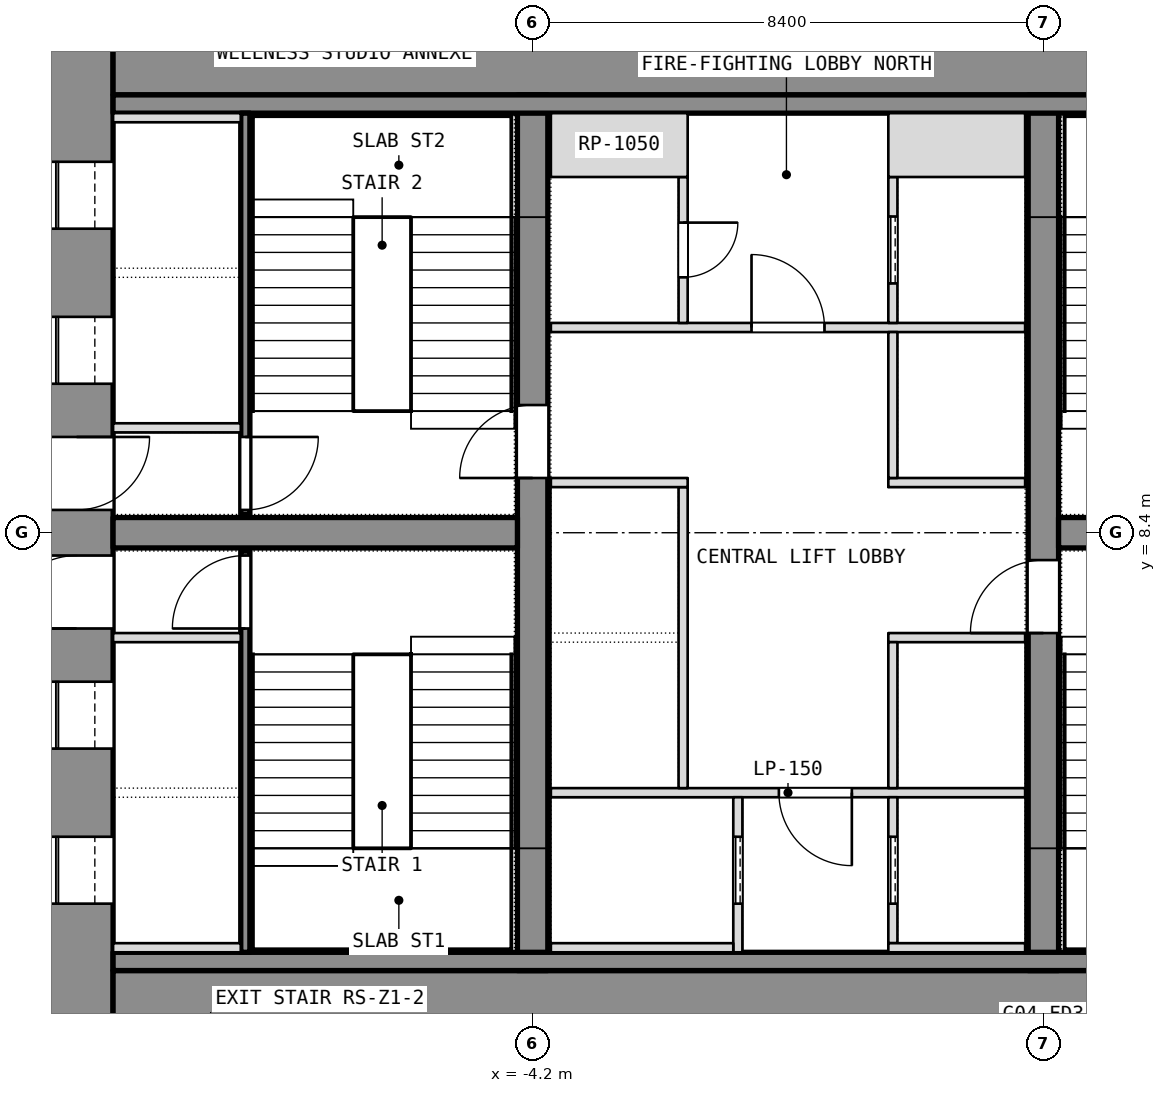
"""IFC4 building model, lengths in metres.
Left out: names, types, materials, properties, quantities, classifications, styles, units other than length and angle.
Written with IfcOpenShell. Run it as: python <this file> out.ifc"""

import sys

from ifc_helpers import new_model, si_unit, direction, frame, frame_2d, origin, place, context, subcontext, project, spatial, rectangle, extrude, element, fill, save


model = new_model("IFC4")
c1 = context("Model", 3, precision=1e-05, world=origin(), true_north=direction((0.0, 1.0)))
c2 = subcontext(c1, "Body", "Model", "MODEL_VIEW")
j1 = project(units=[si_unit("LENGTHUNIT", "METRE"), si_unit("PLANEANGLEUNIT", "RADIAN")], contexts=[c1])
p1 = place(None, origin())
s1 = spatial("IfcSite", under=j1, at=p1, CompositionType="ELEMENT")
p2 = place(p1, origin())
s2 = spatial("IfcBuilding", under=s1, at=p2, CompositionType="ELEMENT")
p3 = place(p2, frame((0.0, 0.0, 54.5)))
s3 = spatial("IfcBuildingStorey", under=s2, at=p3, CompositionType="ELEMENT", Elevation=54.5)
p4 = place(p3, frame((-11.7, 0.0, 0.0), z_axis=(0.0, 0.0, 1.0), x_axis=(0.0, 1.0, 0.0)))
e1 = element("IfcWall", 1, at=p4, inside=s3, PredefinedType="SHEAR", context=c2, shape_type="SweptSolid", body=[
    extrude(rectangle(XDim=16.8, YDim=1.2, at=frame_2d((8.4, 0.0))), origin(), (0.0, 0.0, 1.0), 3.6),
])
p5 = place(p4, frame((2.3, 0.0, 0.0)))
e2 = element("IfcOpeningElement", 2, at=p5, cuts=e1, PredefinedType="OPENING", context=c2, shape_type="SweptSolid", body=[
    extrude(rectangle(XDim=1.1, YDim=2.1, at=frame_2d((0.55, 1.05))), frame((0.0, 0.6, 0.0), z_axis=(0.0, -1.0, 0.0), x_axis=(1.0, 0.0, 0.0)), (0.0, 0.0, 1.0), 1.2),
])
p6 = place(p4, frame((4.85, 0.0, 0.0)))
e3 = element("IfcOpeningElement", 3, at=p6, cuts=e1, PredefinedType="OPENING", context=c2, shape_type="SweptSolid", body=[
    extrude(rectangle(XDim=1.1, YDim=2.1, at=frame_2d((0.55, 1.05))), frame((0.0, 0.6, 0.0), z_axis=(0.0, -1.0, 0.0), x_axis=(1.0, 0.0, 0.0)), (0.0, 0.0, 1.0), 1.2),
])
p7 = place(p4, frame((6.825, 0.0, 0.0)))
e4 = element("IfcOpeningElement", 4, at=p7, cuts=e1, PredefinedType="OPENING", context=c2, shape_type="SweptSolid", body=[
    extrude(rectangle(XDim=1.2, YDim=2.1, at=frame_2d((0.6, 1.05))), frame((0.0, 0.6, 0.0), z_axis=(0.0, -1.0, 0.0), x_axis=(1.0, 0.0, 0.0)), (0.0, 0.0, 1.0), 1.2),
])
p8 = place(p4, frame((13.4, 0.0, 0.0)))
e5 = element("IfcOpeningElement", 5, at=p8, cuts=e1, PredefinedType="OPENING", context=c2, shape_type="SweptSolid", body=[
    extrude(rectangle(XDim=1.1, YDim=2.1, at=frame_2d((0.55, 1.05))), frame((0.0, 0.6, 0.0), z_axis=(0.0, -1.0, 0.0), x_axis=(1.0, 0.0, 0.0)), (0.0, 0.0, 1.0), 1.2),
])
p9 = place(p4, frame((10.85, 0.0, 0.0)))
e6 = element("IfcOpeningElement", 6, at=p9, cuts=e1, PredefinedType="OPENING", context=c2, shape_type="SweptSolid", body=[
    extrude(rectangle(XDim=1.1, YDim=2.1, at=frame_2d((0.55, 1.05))), frame((0.0, 0.6, 0.0), z_axis=(0.0, -1.0, 0.0), x_axis=(1.0, 0.0, 0.0)), (0.0, 0.0, 1.0), 1.2),
])
p10 = place(p4, frame((8.775, 0.0, 0.0)))
e7 = element("IfcOpeningElement", 7, at=p10, cuts=e1, PredefinedType="OPENING", context=c2, shape_type="SweptSolid", body=[
    extrude(rectangle(XDim=1.2, YDim=2.1, at=frame_2d((0.6, 1.05))), frame((0.0, 0.6, 0.0), z_axis=(0.0, -1.0, 0.0), x_axis=(1.0, 0.0, 0.0)), (0.0, 0.0, 1.0), 1.2),
])
for number, where, z_axis, x_axis in (
    (8, (-11.1, 0.6, 0.0), (0.0, 0.0, 1.0), (1.0, 0.0, 0.0)),
    (9, (-11.1, 16.2, 0.0), (0.0, 0.0, 1.0), (1.0, 0.0, 0.0)),
):
    element("IfcWall", number, at=place(p3, frame(where, z_axis=z_axis, x_axis=x_axis)), inside=s3, PredefinedType="SHEAR", context=c2, shape_type="SweptSolid", body=[
        extrude(rectangle(XDim=22.2, YDim=1.2, at=frame_2d((11.1, 0.0))), origin(), (0.0, 0.0, 1.0), 3.6),
    ])
p11 = place(p3, frame((-4.2, 1.2, 0.0), z_axis=(0.0, 0.0, 1.0), x_axis=(0.0, 1.0, 0.0)))
e10 = element("IfcWall", 10, at=p11, inside=s3, PredefinedType="SHEAR", context=c2, shape_type="SweptSolid", body=[
    extrude(rectangle(XDim=14.4, YDim=0.5, at=frame_2d((7.2, 0.0))), origin(), (0.0, 0.0, 1.0), 3.6),
])
p12 = place(p11, frame((8.1, 0.0, 0.0)))
e11 = element("IfcOpeningElement", 11, at=p12, cuts=e10, PredefinedType="OPENING", context=c2, shape_type="SweptSolid", body=[
    extrude(rectangle(XDim=1.2, YDim=2.1, at=frame_2d((0.6, 1.05))), frame((0.0, 0.25, 0.0), z_axis=(0.0, -1.0, 0.0), x_axis=(1.0, 0.0, 0.0)), (0.0, 0.0, 1.0), 0.5),
])
p13 = place(p3, frame((4.2, 1.2, 0.0), z_axis=(0.0, 0.0, 1.0), x_axis=(0.0, 1.0, 0.0)))
e12 = element("IfcWall", 12, at=p13, inside=s3, PredefinedType="SHEAR", context=c2, shape_type="SweptSolid", body=[
    extrude(rectangle(XDim=14.4, YDim=0.5, at=frame_2d((7.2, 0.0))), origin(), (0.0, 0.0, 1.0), 3.6),
])
p14 = place(p13, frame((5.55, 0.0, 0.0)))
e13 = element("IfcOpeningElement", 13, at=p14, cuts=e12, PredefinedType="OPENING", context=c2, shape_type="SweptSolid", body=[
    extrude(rectangle(XDim=1.2, YDim=2.1, at=frame_2d((0.6, 1.05))), frame((0.0, 0.25, 0.0), z_axis=(0.0, -1.0, 0.0), x_axis=(1.0, 0.0, 0.0)), (0.0, 0.0, 1.0), 0.5),
])
for number, where, z_axis, x_axis in (
    (14, (-11.1, 8.4, 0.0), (0.0, 0.0, 1.0), (1.0, 0.0, 0.0)),
    (15, (4.45, 8.4, 0.0), (0.0, 0.0, 1.0), (1.0, 0.0, 0.0)),
):
    element("IfcWall", number, at=place(p3, frame(where, z_axis=z_axis, x_axis=x_axis)), inside=s3, PredefinedType="SHEAR", context=c2, shape_type="SweptSolid", body=[
        extrude(rectangle(XDim=6.65, YDim=0.5, at=frame_2d((3.325, 0.0))), origin(), (0.0, 0.0, 1.0), 3.6),
    ])
for number, where, z_axis, x_axis in (
    (16, (-11.1, 1.35, 0.0), (0.0, 0.0, 1.0), (1.0, 0.0, 0.0)),
    (17, (-11.1, 15.45, 0.0), (0.0, 0.0, 1.0), (1.0, 0.0, 0.0)),
):
    element("IfcWall", number, at=place(p3, frame(where, z_axis=z_axis, x_axis=x_axis)), inside=s3, PredefinedType="PARTITIONING", context=c2, shape_type="SweptSolid", body=[
        extrude(rectangle(XDim=22.2, YDim=0.3, at=frame_2d((11.1, 0.0))), origin(), (0.0, 0.0, 1.0), 3.34),
    ])
p15 = place(p3, frame((-8.925, 1.5, 0.0), z_axis=(0.0, 0.0, 1.0), x_axis=(0.0, 1.0, 0.0)))
e18 = element("IfcWall", 18, at=p15, inside=s3, PredefinedType="SHEAR", context=c2, shape_type="SweptSolid", body=[
    extrude(rectangle(XDim=6.6, YDim=0.15, at=frame_2d((3.3, 0.0))), origin(), (0.0, 0.0, 1.0), 3.34),
])
p16 = place(p15, frame((5.325, 0.0, 0.0)))
e19 = element("IfcOpeningElement", 19, at=p16, cuts=e18, PredefinedType="OPENING", context=c2, shape_type="SweptSolid", body=[
    extrude(rectangle(XDim=1.2, YDim=2.1, at=frame_2d((0.6, 1.05))), frame((0.0, 0.075, 0.0), z_axis=(0.0, -1.0, 0.0), x_axis=(1.0, 0.0, 0.0)), (0.0, 0.0, 1.0), 0.15),
])
for number, where, z_axis, x_axis in (
    (20, (-11.1, 6.675, 0.0), (0.0, 0.0, 1.0), (1.0, 0.0, 0.0)),
    (21, (-11.1, 1.575, 0.0), (0.0, 0.0, 1.0), (1.0, 0.0, 0.0)),
):
    element("IfcWall", number, at=place(p3, frame(where, z_axis=z_axis, x_axis=x_axis)), inside=s3, PredefinedType="SHEAR", context=c2, shape_type="SweptSolid", body=[
        extrude(rectangle(XDim=2.1, YDim=0.15, at=frame_2d((1.05, 0.0))), origin(), (0.0, 0.0, 1.0), 3.6),
    ])
p17 = place(p3, frame((-8.925, 8.7, 0.0), z_axis=(0.0, 0.0, 1.0), x_axis=(0.0, 1.0, 0.0)))
e22 = element("IfcWall", 22, at=p17, inside=s3, PredefinedType="SHEAR", context=c2, shape_type="SweptSolid", body=[
    extrude(rectangle(XDim=6.6, YDim=0.15, at=frame_2d((3.3, 0.0))), origin(), (0.0, 0.0, 1.0), 3.34),
])
p18 = place(p17, frame((0.075, 0.0, 0.0)))
e23 = element("IfcOpeningElement", 23, at=p18, cuts=e22, PredefinedType="OPENING", context=c2, shape_type="SweptSolid", body=[
    extrude(rectangle(XDim=1.2, YDim=2.1, at=frame_2d((0.6, 1.05))), frame((0.0, 0.075, 0.0), z_axis=(0.0, -1.0, 0.0), x_axis=(1.0, 0.0, 0.0)), (0.0, 0.0, 1.0), 0.15),
])
for number, where, z_axis, x_axis in (
    (24, (-11.1, 10.125, 0.0), (0.0, 0.0, 1.0), (1.0, 0.0, 0.0)),
    (25, (-11.1, 15.225, 0.0), (0.0, 0.0, 1.0), (1.0, 0.0, 0.0)),
):
    element("IfcWall", number, at=place(p3, frame(where, z_axis=z_axis, x_axis=x_axis)), inside=s3, PredefinedType="SHEAR", context=c2, shape_type="SweptSolid", body=[
        extrude(rectangle(XDim=2.1, YDim=0.15, at=frame_2d((1.05, 0.0))), origin(), (0.0, 0.0, 1.0), 3.6),
    ])
p19 = place(p3, frame((-3.9, 4.125, 0.0), z_axis=(0.0, 0.0, 1.0), x_axis=(1.0, 0.0, 0.0)))
e26 = element("IfcWall", 26, at=p19, inside=s3, PredefinedType="PARTITIONING", context=c2, shape_type="SweptSolid", body=[
    extrude(rectangle(XDim=7.8, YDim=0.15, at=frame_2d((3.9, 0.0))), origin(), (0.0, 0.0, 1.0), 3.34),
])
p20 = place(p19, frame((3.75, 0.0, 0.0)))
e27 = element("IfcOpeningElement", 27, at=p20, cuts=e26, PredefinedType="OPENING", context=c2, shape_type="SweptSolid", body=[
    extrude(rectangle(XDim=1.2, YDim=2.1, at=frame_2d((0.6, 1.05))), frame((0.0, 0.075, 0.0), z_axis=(0.0, -1.0, 0.0), x_axis=(1.0, 0.0, 0.0)), (0.0, 0.0, 1.0), 0.15),
])
p21 = place(p3, frame((-3.9, 11.775, 0.0), z_axis=(0.0, 0.0, 1.0), x_axis=(1.0, 0.0, 0.0)))
e28 = element("IfcWall", 28, at=p21, inside=s3, PredefinedType="PARTITIONING", context=c2, shape_type="SweptSolid", body=[
    extrude(rectangle(XDim=7.8, YDim=0.15, at=frame_2d((3.9, 0.0))), origin(), (0.0, 0.0, 1.0), 3.34),
])
p22 = place(p21, frame((3.3, 0.0, 0.0)))
e29 = element("IfcOpeningElement", 29, at=p22, cuts=e28, PredefinedType="OPENING", context=c2, shape_type="SweptSolid", body=[
    extrude(rectangle(XDim=1.2, YDim=2.1, at=frame_2d((0.6, 1.05))), frame((0.0, 0.075, 0.0), z_axis=(0.0, -1.0, 0.0), x_axis=(1.0, 0.0, 0.0)), (0.0, 0.0, 1.0), 0.15),
])
p23 = place(p3, frame((-0.825, 1.5, 0.0), z_axis=(0.0, 0.0, 1.0), x_axis=(0.0, 1.0, 0.0)))
e30 = element("IfcWall", 30, at=p23, inside=s3, PredefinedType="SHEAR", context=c2, shape_type="SweptSolid", body=[
    extrude(rectangle(XDim=2.55, YDim=0.15, at=frame_2d((1.275, 0.0))), origin(), (0.0, 0.0, 1.0), 3.6),
])
p24 = place(p23, frame((0.8, 0.0, 0.0)))
e31 = element("IfcOpeningElement", 31, at=p24, cuts=e30, PredefinedType="OPENING", context=c2, shape_type="SweptSolid", body=[
    extrude(rectangle(XDim=1.1, YDim=2.1, at=frame_2d((0.55, 1.05))), frame((0.0, 0.075, 0.0), z_axis=(0.0, -1.0, 0.0), x_axis=(1.0, 0.0, 0.0)), (0.0, 0.0, 1.0), 0.15),
])
p25 = place(p3, frame((-3.9, 1.575, 0.0), z_axis=(0.0, 0.0, 1.0), x_axis=(1.0, 0.0, 0.0)))
e32 = element("IfcWall", 32, at=p25, inside=s3, PredefinedType="SHEAR", context=c2, shape_type="SweptSolid", body=[
    extrude(rectangle(XDim=3.0, YDim=0.15, at=frame_2d((1.5, 0.0))), origin(), (0.0, 0.0, 1.0), 3.6),
])
p26 = place(p3, frame((-1.725, 4.2, 0.0), z_axis=(0.0, 0.0, 1.0), x_axis=(0.0, 1.0, 0.0)))
e33 = element("IfcWall", 33, at=p26, inside=s3, PredefinedType="SHEAR", context=c2, shape_type="SweptSolid", body=[
    extrude(rectangle(XDim=4.95, YDim=0.15, at=frame_2d((2.475, 0.0))), origin(), (0.0, 0.0, 1.0), 3.6),
])
p27 = place(p3, frame((-3.9, 9.225, 0.0), z_axis=(0.0, 0.0, 1.0), x_axis=(1.0, 0.0, 0.0)))
e34 = element("IfcWall", 34, at=p27, inside=s3, PredefinedType="SHEAR", context=c2, shape_type="SweptSolid", body=[
    extrude(rectangle(XDim=2.25, YDim=0.15, at=frame_2d((1.125, 0.0))), origin(), (0.0, 0.0, 1.0), 3.6),
])
p28 = place(p3, frame((-1.725, 11.85, 0.0), z_axis=(0.0, 0.0, 1.0), x_axis=(0.0, 1.0, 0.0)))
e35 = element("IfcWall", 35, at=p28, inside=s3, PredefinedType="PARTITIONING", context=c2, shape_type="SweptSolid", body=[
    extrude(rectangle(XDim=2.4, YDim=0.15, at=frame_2d((1.2, 0.0))), origin(), (0.0, 0.0, 1.0), 3.34),
])
p29 = place(p28, frame((0.75, 0.0, 0.0)))
e36 = element("IfcOpeningElement", 36, at=p29, cuts=e35, PredefinedType="OPENING", context=c2, shape_type="SweptSolid", body=[
    extrude(rectangle(XDim=0.9, YDim=2.1, at=frame_2d((0.45, 1.05))), frame((0.0, 0.075, 0.0), z_axis=(0.0, -1.0, 0.0), x_axis=(1.0, 0.0, 0.0)), (0.0, 0.0, 1.0), 0.15),
])
p30 = place(p3, frame((-3.9, 14.775, 0.0), z_axis=(0.0, 0.0, 1.0), x_axis=(1.0, 0.0, 0.0)))
e37 = element("IfcWall", 37, at=p30, inside=s3, PredefinedType="PARTITIONING", context=c2, shape_type="SweptSolid", body=[
    extrude(rectangle(XDim=2.25, YDim=1.05, at=frame_2d((1.125, 0.0))), origin(), (0.0, 0.0, 1.0), 3.34),
])
p31 = place(p3, frame((1.725, 1.65, 0.0), z_axis=(0.0, 0.0, 1.0), x_axis=(0.0, 1.0, 0.0)))
e38 = element("IfcWall", 38, at=p31, inside=s3, PredefinedType="SHEAR", context=c2, shape_type="SweptSolid", body=[
    extrude(rectangle(XDim=2.4, YDim=0.15, at=frame_2d((1.2, 0.0))), origin(), (0.0, 0.0, 1.0), 3.6),
])
p32 = place(p31, frame((0.65, 0.0, 0.0)))
e39 = element("IfcOpeningElement", 39, at=p32, cuts=e38, PredefinedType="OPENING", context=c2, shape_type="SweptSolid", body=[
    extrude(rectangle(XDim=1.1, YDim=2.1, at=frame_2d((0.55, 1.05))), frame((0.0, 0.075, 0.0), z_axis=(0.0, -1.0, 0.0), x_axis=(1.0, 0.0, 0.0)), (0.0, 0.0, 1.0), 0.15),
])
p33 = place(p3, frame((1.65, 1.575, 0.0), z_axis=(0.0, 0.0, 1.0), x_axis=(1.0, 0.0, 0.0)))
e40 = element("IfcWall", 40, at=p33, inside=s3, PredefinedType="SHEAR", context=c2, shape_type="SweptSolid", body=[
    extrude(rectangle(XDim=2.25, YDim=0.15, at=frame_2d((1.125, 0.0))), origin(), (0.0, 0.0, 1.0), 3.6),
])
p34 = place(p3, frame((1.725, 11.85, 0.0), z_axis=(0.0, 0.0, 1.0), x_axis=(0.0, 1.0, 0.0)))
e41 = element("IfcWall", 41, at=p34, inside=s3, PredefinedType="SHEAR", context=c2, shape_type="SweptSolid", body=[
    extrude(rectangle(XDim=2.4, YDim=0.15, at=frame_2d((1.2, 0.0))), origin(), (0.0, 0.0, 1.0), 3.6),
])
p35 = place(p34, frame((0.65, 0.0, 0.0)))
e42 = element("IfcOpeningElement", 42, at=p35, cuts=e41, PredefinedType="OPENING", context=c2, shape_type="SweptSolid", body=[
    extrude(rectangle(XDim=1.1, YDim=2.1, at=frame_2d((0.55, 1.05))), frame((0.0, 0.075, 0.0), z_axis=(0.0, -1.0, 0.0), x_axis=(1.0, 0.0, 0.0)), (0.0, 0.0, 1.0), 0.15),
])
p36 = place(p3, frame((1.65, 14.775, 0.0), z_axis=(0.0, 0.0, 1.0), x_axis=(1.0, 0.0, 0.0)))
e43 = element("IfcWall", 43, at=p36, inside=s3, PredefinedType="SHEAR", context=c2, shape_type="SweptSolid", body=[
    extrude(rectangle(XDim=2.25, YDim=1.05, at=frame_2d((1.125, 0.0))), origin(), (0.0, 0.0, 1.0), 3.6),
])
for number, where, z_axis, x_axis in (
    (44, (1.65, 6.675, 0.0), (0.0, 0.0, 1.0), (1.0, 0.0, 0.0)),
    (45, (1.65, 9.225, 0.0), (0.0, 0.0, 1.0), (1.0, 0.0, 0.0)),
):
    element("IfcWall", number, at=place(p3, frame(where, z_axis=z_axis, x_axis=x_axis)), inside=s3, PredefinedType="SHEAR", context=c2, shape_type="SweptSolid", body=[
        extrude(rectangle(XDim=2.25, YDim=0.15, at=frame_2d((1.125, 0.0))), origin(), (0.0, 0.0, 1.0), 3.6),
    ])
p37 = place(p3, frame((1.725, 4.2, 0.0), z_axis=(0.0, 0.0, 1.0), x_axis=(0.0, 1.0, 0.0)))
e46 = element("IfcWall", 46, at=p37, inside=s3, PredefinedType="SHEAR", context=c2, shape_type="SweptSolid", body=[
    extrude(rectangle(XDim=2.4, YDim=0.15, at=frame_2d((1.2, 0.0))), origin(), (0.0, 0.0, 1.0), 3.6),
])
p38 = place(p3, frame((1.725, 9.3, 0.0), z_axis=(0.0, 0.0, 1.0), x_axis=(0.0, 1.0, 0.0)))
e47 = element("IfcWall", 47, at=p38, inside=s3, PredefinedType="SHEAR", context=c2, shape_type="SweptSolid", body=[
    extrude(rectangle(XDim=2.4, YDim=0.15, at=frame_2d((1.2, 0.0))), origin(), (0.0, 0.0, 1.0), 3.6),
])
p39 = place(p5, origin())
e48 = element("IfcDoor", 48, at=p39, inside=s3, OperationType="SLIDING_TO_LEFT", PredefinedType="DOOR", context=c2, shape_type="SweptSolid", body=[
    extrude(rectangle(XDim=1.1, YDim=2.1, at=frame_2d((0.55, 1.05))), frame((0.0, 0.025, 0.0), z_axis=(0.0, -1.0, 0.0), x_axis=(1.0, 0.0, 0.0)), (0.0, 0.0, 1.0), 0.05),
])
fill(e2, e48)
p40 = place(p6, origin())
e49 = element("IfcDoor", 49, at=p40, inside=s3, OperationType="SLIDING_TO_LEFT", PredefinedType="DOOR", context=c2, shape_type="SweptSolid", body=[
    extrude(rectangle(XDim=1.1, YDim=2.1, at=frame_2d((0.55, 1.05))), frame((0.0, 0.025, 0.0), z_axis=(0.0, -1.0, 0.0), x_axis=(1.0, 0.0, 0.0)), (0.0, 0.0, 1.0), 0.05),
])
fill(e3, e49)
p41 = place(p7, origin())
e50 = element("IfcDoor", 50, at=p41, inside=s3, OperationType="SINGLE_SWING_LEFT", PredefinedType="DOOR", context=c2, shape_type="SweptSolid", body=[
    extrude(rectangle(XDim=1.2, YDim=2.1, at=frame_2d((0.6, 1.05))), frame((0.0, 0.025, 0.0), z_axis=(0.0, -1.0, 0.0), x_axis=(1.0, 0.0, 0.0)), (0.0, 0.0, 1.0), 0.05),
])
fill(e4, e50)
p42 = place(p16, origin())
e51 = element("IfcDoor", 51, at=p42, inside=s3, OperationType="SINGLE_SWING_LEFT", PredefinedType="DOOR", context=c2, shape_type="SweptSolid", body=[
    extrude(rectangle(XDim=1.2, YDim=2.1, at=frame_2d((0.6, 1.05))), frame((0.0, 0.025, 0.0), z_axis=(0.0, -1.0, 0.0), x_axis=(1.0, 0.0, 0.0)), (0.0, 0.0, 1.0), 0.05),
])
fill(e19, e51)
p43 = place(p8, origin())
e52 = element("IfcDoor", 52, at=p43, inside=s3, OperationType="SLIDING_TO_LEFT", PredefinedType="DOOR", context=c2, shape_type="SweptSolid", body=[
    extrude(rectangle(XDim=1.1, YDim=2.1, at=frame_2d((0.55, 1.05))), frame((0.0, 0.025, 0.0), z_axis=(0.0, -1.0, 0.0), x_axis=(1.0, 0.0, 0.0)), (0.0, 0.0, 1.0), 0.05),
])
fill(e5, e52)
p44 = place(p9, origin())
e53 = element("IfcDoor", 53, at=p44, inside=s3, OperationType="SLIDING_TO_LEFT", PredefinedType="DOOR", context=c2, shape_type="SweptSolid", body=[
    extrude(rectangle(XDim=1.1, YDim=2.1, at=frame_2d((0.55, 1.05))), frame((0.0, 0.025, 0.0), z_axis=(0.0, -1.0, 0.0), x_axis=(1.0, 0.0, 0.0)), (0.0, 0.0, 1.0), 0.05),
])
fill(e6, e53)
p45 = place(p10, origin())
e54 = element("IfcDoor", 54, at=p45, inside=s3, OperationType="SINGLE_SWING_LEFT", PredefinedType="DOOR", context=c2, shape_type="SweptSolid", body=[
    extrude(rectangle(XDim=1.2, YDim=2.1, at=frame_2d((0.6, 1.05))), frame((0.0, 0.025, 0.0), z_axis=(0.0, -1.0, 0.0), x_axis=(1.0, 0.0, 0.0)), (0.0, 0.0, 1.0), 0.05),
])
fill(e7, e54)
p46 = place(p18, origin())
e55 = element("IfcDoor", 55, at=p46, inside=s3, OperationType="SINGLE_SWING_LEFT", PredefinedType="DOOR", context=c2, shape_type="SweptSolid", body=[
    extrude(rectangle(XDim=1.2, YDim=2.1, at=frame_2d((0.6, 1.05))), frame((0.0, 0.025, 0.0), z_axis=(0.0, -1.0, 0.0), x_axis=(1.0, 0.0, 0.0)), (0.0, 0.0, 1.0), 0.05),
])
fill(e23, e55)
p47 = place(p24, origin())
e56 = element("IfcDoor", 56, at=p47, inside=s3, OperationType="SLIDING_TO_LEFT", PredefinedType="DOOR", context=c2, shape_type="SweptSolid", body=[
    extrude(rectangle(XDim=1.1, YDim=2.1, at=frame_2d((0.55, 1.05))), frame((0.0, 0.025, 0.0), z_axis=(0.0, -1.0, 0.0), x_axis=(1.0, 0.0, 0.0)), (0.0, 0.0, 1.0), 0.05),
])
fill(e31, e56)
p48 = place(p32, origin())
e57 = element("IfcDoor", 57, at=p48, inside=s3, OperationType="SLIDING_TO_LEFT", PredefinedType="DOOR", context=c2, shape_type="SweptSolid", body=[
    extrude(rectangle(XDim=1.1, YDim=2.1, at=frame_2d((0.55, 1.05))), frame((0.0, 0.025, 0.0), z_axis=(0.0, -1.0, 0.0), x_axis=(1.0, 0.0, 0.0)), (0.0, 0.0, 1.0), 0.05),
])
fill(e39, e57)
p49 = place(p35, origin())
e58 = element("IfcDoor", 58, at=p49, inside=s3, OperationType="SLIDING_TO_LEFT", PredefinedType="DOOR", context=c2, shape_type="SweptSolid", body=[
    extrude(rectangle(XDim=1.1, YDim=2.1, at=frame_2d((0.55, 1.05))), frame((0.0, 0.025, 0.0), z_axis=(0.0, -1.0, 0.0), x_axis=(1.0, 0.0, 0.0)), (0.0, 0.0, 1.0), 0.05),
])
fill(e42, e58)
p50 = place(p20, origin())
e59 = element("IfcDoor", 59, at=p50, inside=s3, OperationType="SINGLE_SWING_LEFT", PredefinedType="DOOR", context=c2, shape_type="SweptSolid", body=[
    extrude(rectangle(XDim=1.2, YDim=2.1, at=frame_2d((0.6, 1.05))), frame((0.0, 0.025, 0.0), z_axis=(0.0, -1.0, 0.0), x_axis=(1.0, 0.0, 0.0)), (0.0, 0.0, 1.0), 0.05),
])
fill(e27, e59)
p51 = place(p22, origin())
e60 = element("IfcDoor", 60, at=p51, inside=s3, OperationType="SINGLE_SWING_LEFT", PredefinedType="DOOR", context=c2, shape_type="SweptSolid", body=[
    extrude(rectangle(XDim=1.2, YDim=2.1, at=frame_2d((0.6, 1.05))), frame((0.0, 0.025, 0.0), z_axis=(0.0, -1.0, 0.0), x_axis=(1.0, 0.0, 0.0)), (0.0, 0.0, 1.0), 0.05),
])
fill(e29, e60)
p52 = place(p29, origin())
e61 = element("IfcDoor", 61, at=p52, inside=s3, OperationType="SINGLE_SWING_LEFT", PredefinedType="DOOR", context=c2, shape_type="SweptSolid", body=[
    extrude(rectangle(XDim=0.9, YDim=2.1, at=frame_2d((0.45, 1.05))), frame((0.0, 0.025, 0.0), z_axis=(0.0, -1.0, 0.0), x_axis=(1.0, 0.0, 0.0)), (0.0, 0.0, 1.0), 0.05),
])
fill(e36, e61)
p53 = place(p12, origin())
e62 = element("IfcDoor", 62, at=p53, inside=s3, OperationType="SINGLE_SWING_LEFT", PredefinedType="DOOR", context=c2, shape_type="SweptSolid", body=[
    extrude(rectangle(XDim=1.2, YDim=2.1, at=frame_2d((0.6, 1.05))), frame((0.0, 0.025, 0.0), z_axis=(0.0, -1.0, 0.0), x_axis=(1.0, 0.0, 0.0)), (0.0, 0.0, 1.0), 0.05),
])
fill(e11, e62)
p54 = place(p14, origin())
e63 = element("IfcDoor", 63, at=p54, inside=s3, OperationType="SINGLE_SWING_LEFT", PredefinedType="DOOR", context=c2, shape_type="SweptSolid", body=[
    extrude(rectangle(XDim=1.2, YDim=2.1, at=frame_2d((0.6, 1.05))), frame((0.0, 0.025, 0.0), z_axis=(0.0, -1.0, 0.0), x_axis=(1.0, 0.0, 0.0)), (0.0, 0.0, 1.0), 0.05),
])
fill(e13, e63)
save(model, sys.argv[1])
